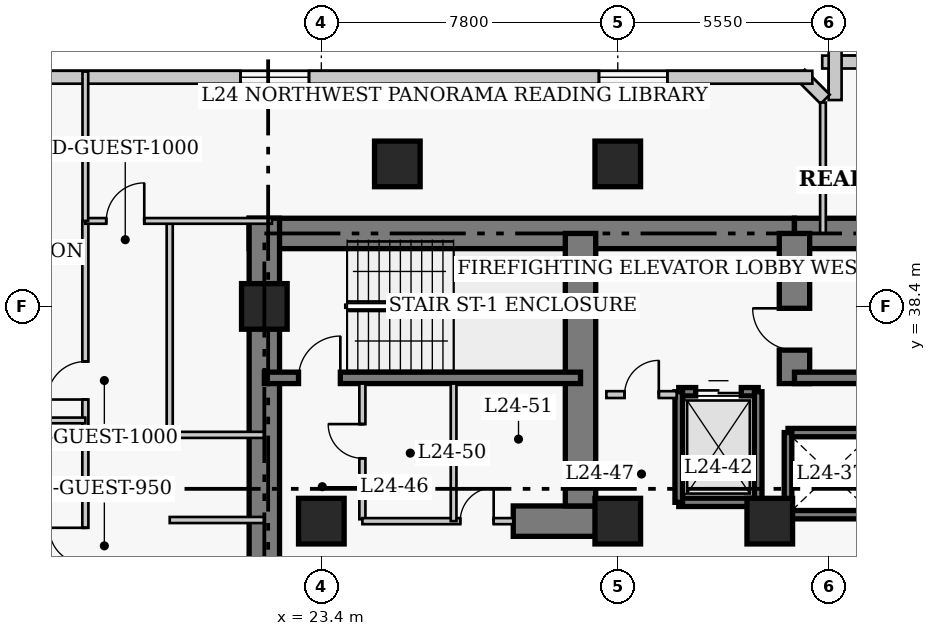
"""IFC4 building model, lengths in metres.
Left out: names, types, materials, properties, quantities, classifications, styles, units other than length and angle.
Written with IfcOpenShell. Run it as: python <this file> out.ifc"""

import sys

from ifc_helpers import new_model, si_unit, direction, frame, frame_2d, origin, origin_2d, place, context, subcontext, project, spatial, rectangle, extrude, element, fill, save


model = new_model("IFC4")
c1 = context("Model", 3, precision=1e-05, world=origin(), true_north=direction((0.0, 1.0)))
c2 = subcontext(c1, "Body", "Model", "MODEL_VIEW")
j1 = project(units=[si_unit("LENGTHUNIT", "METRE"), si_unit("PLANEANGLEUNIT", "RADIAN")], contexts=[c1])
p1 = place(None, origin())
s1 = spatial("IfcSite", under=j1, at=p1, CompositionType="ELEMENT")
p2 = place(p1, origin())
s2 = spatial("IfcBuilding", under=s1, at=p2, CompositionType="ELEMENT")
p3 = place(p2, frame((0.0, 0.0, 99.4)))
s3 = spatial("IfcBuildingStorey", under=s2, at=p3, CompositionType="ELEMENT", Elevation=99.4)
p4 = place(p3, frame((21.5, 40.32, 0.0), z_axis=(0.0, 0.0, 1.0), x_axis=(1.0, 0.0, 0.0)))
e1 = element("IfcWall", 1, at=p4, inside=s3, PredefinedType="SHEAR", context=c2, shape_type="SweptSolid", body=[
    extrude(rectangle(XDim=14.35, YDim=0.8, at=frame_2d((7.175, 0.0))), origin(), (0.0, 0.0, 1.0), 3.8),
])
p5 = place(p3, frame((35.85, 40.32, 0.0), z_axis=(0.0, 0.0, 1.0), x_axis=(1.0, 0.0, 0.0)))
e2 = element("IfcWall", 2, at=p5, inside=s3, PredefinedType="SHEAR", context=c2, shape_type="SweptSolid", body=[
    extrude(rectangle(XDim=12.6, YDim=0.8, at=frame_2d((6.3, 0.0))), origin(), (0.0, 0.0, 1.0), 3.8),
])
p6 = place(p3, frame((21.9, 27.05, 0.0), z_axis=(0.0, 0.0, 1.0), x_axis=(0.0, 1.0, 0.0)))
e3 = element("IfcWall", 3, at=p6, inside=s3, PredefinedType="SHEAR", context=c2, shape_type="SweptSolid", body=[
    extrude(rectangle(XDim=13.67, YDim=0.8, at=frame_2d((6.835, 0.0))), origin(), (0.0, 0.0, 1.0), 3.8),
])
p7 = place(p3, frame((28.45, 32.75, 0.0), z_axis=(0.0, 0.0, 1.0), x_axis=(1.0, 0.0, 0.0)))
e4 = element("IfcWall", 4, at=p7, inside=s3, PredefinedType="SHEAR", context=c2, shape_type="SweptSolid", body=[
    extrude(rectangle(XDim=2.4, YDim=0.8, at=frame_2d((1.2, 0.0))), origin(), (0.0, 0.0, 1.0), 3.8),
])
p8 = place(p3, frame((30.22, 33.15, 0.0), z_axis=(0.0, 0.0, 1.0), x_axis=(0.0, 1.0, 0.0)))
e5 = element("IfcWall", 5, at=p8, inside=s3, PredefinedType="SHEAR", context=c2, shape_type="SweptSolid", body=[
    extrude(rectangle(XDim=7.17, YDim=0.8, at=frame_2d((3.585, 0.0))), origin(), (0.0, 0.0, 1.0), 3.8),
])
p9 = place(p3, frame((35.85, 36.37, 0.0), z_axis=(0.0, 0.0, 1.0), x_axis=(0.0, 1.0, 0.0)))
e6 = element("IfcWall", 6, at=p9, inside=s3, PredefinedType="SHEAR", context=c2, shape_type="SweptSolid", body=[
    extrude(rectangle(XDim=3.95, YDim=0.8, at=frame_2d((1.975, 0.0))), origin(), (0.0, 0.0, 1.0), 3.8),
])
p10 = place(p9, frame((0.88, 0.0, 0.0)))
e7 = element("IfcOpeningElement", 7, at=p10, cuts=e6, PredefinedType="OPENING", context=c2, shape_type="SweptSolid", body=[
    extrude(rectangle(XDim=1.1, YDim=2.15, at=frame_2d((0.55, 1.075))), frame((0.0, 0.41, 0.0), z_axis=(0.0, -1.0, 0.0), x_axis=(1.0, 0.0, 0.0)), (0.0, 0.0, 1.0), 0.82),
])
p11 = place(p3, frame((21.9, 36.52, 0.0), z_axis=(0.0, 0.0, 1.0), x_axis=(1.0, 0.0, 0.0)))
e8 = element("IfcWall", 8, at=p11, inside=s3, PredefinedType="SHEAR", context=c2, shape_type="SweptSolid", body=[
    extrude(rectangle(XDim=8.32, YDim=0.3, at=frame_2d((4.16, 0.0))), origin(), (0.0, 0.0, 1.0), 3.8),
])
p12 = place(p11, frame((0.9, 0.0, 0.0)))
e9 = element("IfcOpeningElement", 9, at=p12, cuts=e8, PredefinedType="OPENING", context=c2, shape_type="SweptSolid", body=[
    extrude(rectangle(XDim=1.1, YDim=2.15, at=frame_2d((0.55, 1.075))), frame((0.0, 0.16, 0.0), z_axis=(0.0, -1.0, 0.0), x_axis=(1.0, 0.0, 0.0)), (0.0, 0.0, 1.0), 0.32),
])
p13 = place(p3, frame((35.85, 36.52, 0.0), z_axis=(0.0, 0.0, 1.0), x_axis=(1.0, 0.0, 0.0)))
e10 = element("IfcWall", 10, at=p13, inside=s3, PredefinedType="SHEAR", context=c2, shape_type="SweptSolid", body=[
    extrude(rectangle(XDim=8.33, YDim=0.3, at=frame_2d((4.165, 0.0))), origin(), (0.0, 0.0, 1.0), 3.8),
])
for number, where, z_axis, x_axis in (
    (11, (21.9, 38.4, 0.0), (0.0, 0.0, 1.0), (1.0, 0.0, 0.0)),
    (12, (23.4, 32.75, 0.0), (0.0, 0.0, 1.0), (1.0, 0.0, 0.0)),
    (13, (31.2, 32.75, 0.0), (0.0, 0.0, 1.0), (1.0, 0.0, 0.0)),
    (14, (35.2, 32.75, 0.0), (0.0, 0.0, 1.0), (1.0, 0.0, 0.0)),
    (15, (25.4, 42.15, 0.0), (0.0, 0.0, 1.0), (1.0, 0.0, 0.0)),
    (16, (31.2, 42.15, 0.0), (0.0, 0.0, 1.0), (1.0, 0.0, 0.0)),
):
    element("IfcColumn", number, at=place(p3, frame(where, z_axis=z_axis, x_axis=x_axis)), inside=s3, PredefinedType="COLUMN", context=c2, shape_type="SweptSolid", body=[
        extrude(rectangle(XDim=1.2, YDim=1.2, at=origin_2d()), origin(), (0.0, 0.0, 1.0), 3.8),
    ])
p14 = place(p3, frame((41.42, 44.83, 0.0), z_axis=(0.0, 0.0, 1.0), x_axis=(-1.0, 0.0, 0.0)))
e17 = element("IfcWall", 17, at=p14, inside=s3, PredefinedType="SOLIDWALL", context=c2, shape_type="SweptSolid", body=[
    extrude(rectangle(XDim=4.84, YDim=0.34, at=frame_2d((2.42, 0.0))), origin(), (0.0, 0.0, 1.0), 3.54),
])
p15 = place(p14, frame((1.52, 0.0, 0.85)))
e18 = element("IfcOpeningElement", 18, at=p15, cuts=e17, PredefinedType="OPENING", context=c2, shape_type="SweptSolid", body=[
    extrude(rectangle(XDim=1.8, YDim=1.8, at=frame_2d((0.9, 0.9))), frame((0.0, 0.18, 0.0), z_axis=(0.0, -1.0, 0.0), x_axis=(1.0, 0.0, 0.0)), (0.0, 0.0, 1.0), 0.36),
])
p16 = place(p3, frame((36.92, 45.17, 0.0), z_axis=(0.0, 0.0, 1.0), x_axis=(0.0, -1.0, 0.0)))
e19 = element("IfcWall", 19, at=p16, inside=s3, PredefinedType="SOLIDWALL", context=c2, shape_type="SweptSolid", body=[
    extrude(rectangle(XDim=1.34, YDim=0.34, at=frame_2d((0.67, 0.0))), origin(), (0.0, 0.0, 1.0), 3.54),
])
p17 = place(p3, frame((36.658, 43.852, 0.0), z_axis=(0.0, 0.0, 1.0), x_axis=(-0.707238225886, 0.706975312048, 0.0)))
e20 = element("IfcWall", 20, at=p17, inside=s3, PredefinedType="SOLIDWALL", context=c2, shape_type="SweptSolid", body=[
    extrude(rectangle(XDim=0.929, YDim=0.34, at=frame_2d((0.464, 0.0))), origin(), (0.0, 0.0, 1.0), 3.54),
])
p18 = place(p3, frame((36.32, 44.43, 0.0), z_axis=(0.0, 0.0, 1.0), x_axis=(-1.0, 0.0, 0.0)))
e21 = element("IfcWall", 21, at=p18, inside=s3, PredefinedType="SOLIDWALL", context=c2, shape_type="SweptSolid", body=[
    extrude(rectangle(XDim=28.29, YDim=0.34, at=frame_2d((14.145, 0.0))), origin(), (0.0, 0.0, 1.0), 3.54),
])
p19 = place(p18, frame((3.815, 0.0, 0.85)))
e22 = element("IfcOpeningElement", 22, at=p19, cuts=e21, PredefinedType="OPENING", context=c2, shape_type="SweptSolid", body=[
    extrude(rectangle(XDim=1.8, YDim=1.8, at=frame_2d((0.9, 0.9))), frame((0.0, 0.18, 0.0), z_axis=(0.0, -1.0, 0.0), x_axis=(1.0, 0.0, 0.0)), (0.0, 0.0, 1.0), 0.36),
])
p20 = place(p18, frame((13.245, 0.0, 0.85)))
e23 = element("IfcOpeningElement", 23, at=p20, cuts=e21, PredefinedType="OPENING", context=c2, shape_type="SweptSolid", body=[
    extrude(rectangle(XDim=1.8, YDim=1.8, at=frame_2d((0.9, 0.9))), frame((0.0, 0.18, 0.0), z_axis=(0.0, -1.0, 0.0), x_axis=(1.0, 0.0, 0.0)), (0.0, 0.0, 1.0), 0.36),
])
p21 = place(p18, frame((22.675, 0.0, 0.85)))
e24 = element("IfcOpeningElement", 24, at=p21, cuts=e21, PredefinedType="OPENING", context=c2, shape_type="SweptSolid", body=[
    extrude(rectangle(XDim=1.8, YDim=1.8, at=frame_2d((0.9, 0.9))), frame((0.0, 0.18, 0.0), z_axis=(0.0, -1.0, 0.0), x_axis=(1.0, 0.0, 0.0)), (0.0, 0.0, 1.0), 0.36),
])
for number, where, z_axis, x_axis in (
    (25, (35.68, 35.08, 0.0), (0.0, 0.0, 1.0), (1.0, 0.0, 0.0)),
    (26, (35.68, 32.92, 0.0), (0.0, 0.0, 1.0), (1.0, 0.0, 0.0)),
):
    element("IfcWall", number, at=place(p3, frame(where, z_axis=z_axis, x_axis=x_axis)), inside=s3, PredefinedType="SHEAR", context=c2, shape_type="SweptSolid", body=[
        extrude(rectangle(XDim=2.32, YDim=0.22, at=frame_2d((1.16, 0.0))), origin(), (0.0, 0.0, 1.0), 3.8),
    ])
p22 = place(p3, frame((35.68, 32.92, 0.0), z_axis=(0.0, 0.0, 1.0), x_axis=(0.0, 1.0, 0.0)))
e27 = element("IfcWall", 27, at=p22, inside=s3, PredefinedType="SHEAR", context=c2, shape_type="SweptSolid", body=[
    extrude(rectangle(XDim=2.16, YDim=0.2, at=frame_2d((1.08, 0.0))), origin(), (0.0, 0.0, 1.0), 3.8),
])
p23 = place(p3, frame((32.805, 36.155, 0.0), z_axis=(0.0, 0.0, 1.0), x_axis=(1.0, 0.0, 0.0)))
e28 = element("IfcWall", 28, at=p23, inside=s3, PredefinedType="SHEAR", context=c2, shape_type="SweptSolid", body=[
    extrude(rectangle(XDim=2.09, YDim=0.22, at=frame_2d((1.045, 0.0))), origin(), (0.0, 0.0, 1.0), 3.8),
])
p24 = place(p23, frame((0.445, 0.0, 0.0)))
e29 = element("IfcOpeningElement", 29, at=p24, cuts=e28, PredefinedType="OPENING", context=c2, shape_type="SweptSolid", body=[
    extrude(rectangle(XDim=1.2, YDim=2.15, at=frame_2d((0.6, 1.075))), frame((0.0, 0.12, 0.0), z_axis=(0.0, -1.0, 0.0), x_axis=(1.0, 0.0, 0.0)), (0.0, 0.0, 1.0), 0.24),
])
p25 = place(p3, frame((32.805, 33.245, 0.0), z_axis=(0.0, 0.0, 1.0), x_axis=(1.0, 0.0, 0.0)))
e30 = element("IfcWall", 30, at=p25, inside=s3, PredefinedType="SHEAR", context=c2, shape_type="SweptSolid", body=[
    extrude(rectangle(XDim=2.09, YDim=0.22, at=frame_2d((1.045, 0.0))), origin(), (0.0, 0.0, 1.0), 3.8),
])
for number, where, z_axis, x_axis in (
    (31, (32.805, 33.245, 0.0), (0.0, 0.0, 1.0), (0.0, 1.0, 0.0)),
    (32, (34.895, 33.245, 0.0), (0.0, 0.0, 1.0), (0.0, 1.0, 0.0)),
):
    element("IfcWall", number, at=place(p3, frame(where, z_axis=z_axis, x_axis=x_axis)), inside=s3, PredefinedType="SHEAR", context=c2, shape_type="SweptSolid", body=[
        extrude(rectangle(XDim=2.91, YDim=0.2, at=frame_2d((1.455, 0.0))), origin(), (0.0, 0.0, 1.0), 3.8),
    ])
p26 = place(p3, frame((30.9, 36.08, 0.0), z_axis=(0.0, 0.0, 1.0), x_axis=(1.0, 0.0, 0.0)))
e33 = element("IfcWall", 33, at=p26, inside=s3, PredefinedType="PARTITIONING", context=c2, shape_type="SweptSolid", body=[
    extrude(rectangle(XDim=1.85, YDim=0.18, at=frame_2d((0.925, 0.0))), origin(), (0.0, 0.0, 1.0), 3.54),
])
p27 = place(p26, frame((0.48, 0.0, 0.0)))
e34 = element("IfcOpeningElement", 34, at=p27, cuts=e33, PredefinedType="OPENING", context=c2, shape_type="SweptSolid", body=[
    extrude(rectangle(XDim=0.9, YDim=2.15, at=frame_2d((0.45, 1.075))), frame((0.0, 0.1, 0.0), z_axis=(0.0, -1.0, 0.0), x_axis=(1.0, 0.0, 0.0)), (0.0, 0.0, 1.0), 0.2),
])
p28 = place(p3, frame((24.48, 32.8, 0.0), z_axis=(0.0, 0.0, 1.0), x_axis=(0.0, 1.0, 0.0)))
e35 = element("IfcWall", 35, at=p28, inside=s3, PredefinedType="PARTITIONING", context=c2, shape_type="SweptSolid", body=[
    extrude(rectangle(XDim=3.57, YDim=0.16, at=frame_2d((1.785, 0.0))), origin(), (0.0, 0.0, 1.0), 3.54),
])
p29 = place(p28, frame((1.604, 0.0, 0.0)))
e36 = element("IfcOpeningElement", 36, at=p29, cuts=e35, PredefinedType="OPENING", context=c2, shape_type="SweptSolid", body=[
    extrude(rectangle(XDim=0.9, YDim=2.1, at=frame_2d((0.45, 1.05))), frame((0.0, 0.09, 0.0), z_axis=(0.0, -1.0, 0.0), x_axis=(1.0, 0.0, 0.0)), (0.0, 0.0, 1.0), 0.18),
])
p30 = place(p3, frame((24.48, 32.75, 0.0), z_axis=(0.0, 0.0, 1.0), x_axis=(1.0, 0.0, 0.0)))
e37 = element("IfcWall", 37, at=p30, inside=s3, PredefinedType="PARTITIONING", context=c2, shape_type="SweptSolid", body=[
    extrude(rectangle(XDim=3.97, YDim=0.16, at=frame_2d((1.985, 0.0))), origin(), (0.0, 0.0, 1.0), 3.54),
])
p31 = place(p30, frame((2.575, 0.0, 0.0)))
e38 = element("IfcOpeningElement", 38, at=p31, cuts=e37, PredefinedType="OPENING", context=c2, shape_type="SweptSolid", body=[
    extrude(rectangle(XDim=0.88, YDim=2.05, at=frame_2d((0.44, 1.025))), frame((0.0, 0.09, 0.0), z_axis=(0.0, -1.0, 0.0), x_axis=(1.0, 0.0, 0.0)), (0.0, 0.0, 1.0), 0.18),
])
p32 = place(p3, frame((26.88, 32.75, 0.0), z_axis=(0.0, 0.0, 1.0), x_axis=(0.0, 1.0, 0.0)))
e39 = element("IfcWall", 39, at=p32, inside=s3, PredefinedType="PARTITIONING", context=c2, shape_type="SweptSolid", body=[
    extrude(rectangle(XDim=3.62, YDim=0.15, at=frame_2d((1.81, 0.0))), origin(), (0.0, 0.0, 1.0), 3.54),
])
p33 = place(p3, frame((17.19, 6.65, 0.0), z_axis=(0.0, 0.0, 1.0), x_axis=(0.0, 1.0, 0.0)))
e40 = element("IfcWall", 40, at=p33, inside=s3, PredefinedType="PARTITIONING", context=c2, shape_type="SweptSolid", body=[
    extrude(rectangle(XDim=34.0, YDim=0.16, at=frame_2d((17.0, 0.0))), origin(), (0.0, 0.0, 1.0), 3.54),
])
p34 = place(p33, frame((1.8, 0.0, 0.0)))
e41 = element("IfcOpeningElement", 41, at=p34, cuts=e40, PredefinedType="OPENING", context=c2, shape_type="SweptSolid", body=[
    extrude(rectangle(XDim=0.95, YDim=2.1, at=frame_2d((0.475, 1.05))), frame((0.0, 0.09, 0.0), z_axis=(0.0, -1.0, 0.0), x_axis=(1.0, 0.0, 0.0)), (0.0, 0.0, 1.0), 0.18),
])
p35 = place(p33, frame((8.475, 0.0, 0.0)))
e42 = element("IfcOpeningElement", 42, at=p35, cuts=e40, PredefinedType="OPENING", context=c2, shape_type="SweptSolid", body=[
    extrude(rectangle(XDim=0.95, YDim=2.1, at=frame_2d((0.475, 1.05))), frame((0.0, 0.09, 0.0), z_axis=(0.0, -1.0, 0.0), x_axis=(1.0, 0.0, 0.0)), (0.0, 0.0, 1.0), 0.18),
])
p36 = place(p33, frame((17.275, 0.0, 0.0)))
e43 = element("IfcOpeningElement", 43, at=p36, cuts=e40, PredefinedType="OPENING", context=c2, shape_type="SweptSolid", body=[
    extrude(rectangle(XDim=0.95, YDim=2.1, at=frame_2d((0.475, 1.05))), frame((0.0, 0.09, 0.0), z_axis=(0.0, -1.0, 0.0), x_axis=(1.0, 0.0, 0.0)), (0.0, 0.0, 1.0), 0.18),
])
p37 = place(p33, frame((24.975, 0.0, 0.0)))
e44 = element("IfcOpeningElement", 44, at=p37, cuts=e40, PredefinedType="OPENING", context=c2, shape_type="SweptSolid", body=[
    extrude(rectangle(XDim=0.95, YDim=2.1, at=frame_2d((0.475, 1.05))), frame((0.0, 0.09, 0.0), z_axis=(0.0, -1.0, 0.0), x_axis=(1.0, 0.0, 0.0)), (0.0, 0.0, 1.0), 0.18),
])
p38 = place(p33, frame((29.3, 0.0, 0.0)))
e45 = element("IfcOpeningElement", 45, at=p38, cuts=e40, PredefinedType="OPENING", context=c2, shape_type="SweptSolid", body=[
    extrude(rectangle(XDim=1.0, YDim=2.15, at=frame_2d((0.5, 1.075))), frame((0.0, 0.09, 0.0), z_axis=(0.0, -1.0, 0.0), x_axis=(1.0, 0.0, 0.0)), (0.0, 0.0, 1.0), 0.18),
])
p39 = place(p3, frame((19.41, 35.02, 0.0), z_axis=(0.0, 0.0, 1.0), x_axis=(0.0, 1.0, 0.0)))
e46 = element("IfcWall", 46, at=p39, inside=s3, PredefinedType="PARTITIONING", context=c2, shape_type="SweptSolid", body=[
    extrude(rectangle(XDim=5.63, YDim=0.16, at=frame_2d((2.815, 0.0))), origin(), (0.0, 0.0, 1.0), 3.54),
])
for number, where, z_axis, x_axis in (
    (47, (19.41, 35.02, 0.0), (0.0, 0.0, 1.0), (1.0, 0.0, 0.0)),
    (48, (19.41, 32.78, 0.0), (0.0, 0.0, 1.0), (1.0, 0.0, 0.0)),
):
    element("IfcWall", number, at=place(p3, frame(where, z_axis=z_axis, x_axis=x_axis)), inside=s3, PredefinedType="PARTITIONING", context=c2, shape_type="SweptSolid", body=[
        extrude(rectangle(XDim=2.49, YDim=0.16, at=frame_2d((1.245, 0.0))), origin(), (0.0, 0.0, 1.0), 3.54),
    ])
p40 = place(p3, frame((17.19, 40.65, 0.0), z_axis=(0.0, 0.0, 1.0), x_axis=(1.0, 0.0, 0.0)))
e49 = element("IfcWall", 49, at=p40, inside=s3, PredefinedType="PARTITIONING", context=c2, shape_type="SweptSolid", body=[
    extrude(rectangle(XDim=4.91, YDim=0.15, at=frame_2d((2.455, 0.0))), origin(), (0.0, 0.0, 1.0), 3.54),
])
p41 = place(p40, frame((0.55, 0.0, 0.0)))
e50 = element("IfcOpeningElement", 50, at=p41, cuts=e49, PredefinedType="OPENING", context=c2, shape_type="SweptSolid", body=[
    extrude(rectangle(XDim=1.0, YDim=2.15, at=frame_2d((0.5, 1.075))), frame((0.0, 0.085, 0.0), z_axis=(0.0, -1.0, 0.0), x_axis=(1.0, 0.0, 0.0)), (0.0, 0.0, 1.0), 0.17),
])
p42 = place(p3, frame((17.19, 40.65, 0.0), z_axis=(0.0, 0.0, 1.0), x_axis=(0.0, 1.0, 0.0)))
e51 = element("IfcWall", 51, at=p42, inside=s3, PredefinedType="PARTITIONING", context=c2, shape_type="SweptSolid", body=[
    extrude(rectangle(XDim=3.93, YDim=0.15, at=frame_2d((1.965, 0.0))), origin(), (0.0, 0.0, 1.0), 3.54),
])
p43 = place(p3, frame((36.6, 40.32, 0.0), z_axis=(0.0, 0.0, 1.0), x_axis=(0.0, 1.0, 0.0)))
e52 = element("IfcWall", 52, at=p43, inside=s3, PredefinedType="PARTITIONING", context=c2, shape_type="SweptSolid", body=[
    extrude(rectangle(XDim=3.445, YDim=0.15, at=frame_2d((1.723, 0.0))), origin(), (0.0, 0.0, 1.0), 3.54),
])
p44 = place(p3, frame((14.45, 35.4, 0.0), z_axis=(0.0, 0.0, 1.0), x_axis=(1.0, 0.0, 0.0)))
e53 = element("IfcWall", 53, at=p44, inside=s3, PredefinedType="PARTITIONING", context=c2, shape_type="SweptSolid", body=[
    extrude(rectangle(XDim=2.74, YDim=0.15, at=frame_2d((1.37, 0.0))), origin(), (0.0, 0.0, 1.0), 3.54),
])
p45 = place(p19, origin())
e54 = element("IfcWindow", 54, at=p45, inside=s3, PartitioningType="SINGLE_PANEL", PredefinedType="WINDOW", context=c2, shape_type="SweptSolid", body=[
    extrude(rectangle(XDim=1.8, YDim=1.8, at=frame_2d((0.9, 0.9))), frame((0.0, 0.03, 0.0), z_axis=(0.0, -1.0, 0.0), x_axis=(1.0, 0.0, 0.0)), (0.0, 0.0, 1.0), 0.06),
])
fill(e22, e54)
p46 = place(p20, origin())
e55 = element("IfcWindow", 55, at=p46, inside=s3, PartitioningType="SINGLE_PANEL", PredefinedType="WINDOW", context=c2, shape_type="SweptSolid", body=[
    extrude(rectangle(XDim=1.8, YDim=1.8, at=frame_2d((0.9, 0.9))), frame((0.0, 0.03, 0.0), z_axis=(0.0, -1.0, 0.0), x_axis=(1.0, 0.0, 0.0)), (0.0, 0.0, 1.0), 0.06),
])
fill(e23, e55)
p47 = place(p24, origin())
e56 = element("IfcDoor", 56, at=p47, inside=s3, OperationType="DOUBLE_DOOR_SLIDING", PredefinedType="DOOR", context=c2, shape_type="SweptSolid", body=[
    extrude(rectangle(XDim=1.2, YDim=2.15, at=frame_2d((0.6, 1.075))), frame((0.0, 0.025, 0.0), z_axis=(0.0, -1.0, 0.0), x_axis=(1.0, 0.0, 0.0)), (0.0, 0.0, 1.0), 0.05),
])
fill(e29, e56)
p48 = place(p27, origin())
e57 = element("IfcDoor", 57, at=p48, inside=s3, OperationType="SINGLE_SWING_RIGHT", PredefinedType="DOOR", context=c2, shape_type="SweptSolid", body=[
    extrude(rectangle(XDim=0.9, YDim=2.15, at=frame_2d((0.45, 1.075))), frame((0.0, 0.025, 0.0), z_axis=(0.0, -1.0, 0.0), x_axis=(1.0, 0.0, 0.0)), (0.0, 0.0, 1.0), 0.05),
])
fill(e34, e57)
p49 = place(p29, origin())
e58 = element("IfcDoor", 58, at=p49, inside=s3, OperationType="SINGLE_SWING_RIGHT", PredefinedType="DOOR", context=c2, shape_type="SweptSolid", body=[
    extrude(rectangle(XDim=0.9, YDim=2.1, at=frame_2d((0.45, 1.05))), frame((0.0, 0.025, 0.0), z_axis=(0.0, -1.0, 0.0), x_axis=(1.0, 0.0, 0.0)), (0.0, 0.0, 1.0), 0.05),
])
fill(e36, e58)
p50 = place(p31, origin())
e59 = element("IfcDoor", 59, at=p50, inside=s3, OperationType="SINGLE_SWING_RIGHT", PredefinedType="DOOR", context=c2, shape_type="SweptSolid", body=[
    extrude(rectangle(XDim=0.88, YDim=2.05, at=frame_2d((0.44, 1.025))), frame((0.0, 0.025, 0.0), z_axis=(0.0, -1.0, 0.0), x_axis=(1.0, 0.0, 0.0)), (0.0, 0.0, 1.0), 0.05),
])
fill(e38, e59)
p51 = place(p41, origin())
e60 = element("IfcDoor", 60, at=p51, inside=s3, OperationType="SINGLE_SWING_RIGHT", PredefinedType="DOOR", context=c2, shape_type="SweptSolid", body=[
    extrude(rectangle(XDim=1.0, YDim=2.15, at=frame_2d((0.5, 1.075))), frame((0.0, 0.025, 0.0), z_axis=(0.0, -1.0, 0.0), x_axis=(1.0, 0.0, 0.0)), (0.0, 0.0, 1.0), 0.05),
])
fill(e50, e60)
p52 = place(p37, origin())
e61 = element("IfcDoor", 61, at=p52, inside=s3, OperationType="SINGLE_SWING_RIGHT", PredefinedType="DOOR", context=c2, shape_type="SweptSolid", body=[
    extrude(rectangle(XDim=0.95, YDim=2.1, at=frame_2d((0.475, 1.05))), frame((0.0, 0.025, 0.0), z_axis=(0.0, -1.0, 0.0), x_axis=(1.0, 0.0, 0.0)), (0.0, 0.0, 1.0), 0.05),
])
fill(e44, e61)
p53 = place(p38, origin())
e62 = element("IfcDoor", 62, at=p53, inside=s3, OperationType="SINGLE_SWING_LEFT", PredefinedType="DOOR", context=c2, shape_type="SweptSolid", body=[
    extrude(rectangle(XDim=1.0, YDim=2.15, at=frame_2d((0.5, 1.075))), frame((0.0, 0.025, 0.0), z_axis=(0.0, -1.0, 0.0), x_axis=(1.0, 0.0, 0.0)), (0.0, 0.0, 1.0), 0.05),
])
fill(e45, e62)
p54 = place(p12, origin())
e63 = element("IfcDoor", 63, at=p54, inside=s3, OperationType="SINGLE_SWING_RIGHT", PredefinedType="DOOR", context=c2, shape_type="SweptSolid", body=[
    extrude(rectangle(XDim=1.1, YDim=2.15, at=frame_2d((0.55, 1.075))), frame((0.0, 0.025, 0.0), z_axis=(0.0, -1.0, 0.0), x_axis=(1.0, 0.0, 0.0)), (0.0, 0.0, 1.0), 0.05),
])
fill(e9, e63)
p55 = place(p10, origin())
e64 = element("IfcDoor", 64, at=p55, inside=s3, OperationType="SINGLE_SWING_RIGHT", PredefinedType="DOOR", context=c2, shape_type="SweptSolid", body=[
    extrude(rectangle(XDim=1.1, YDim=2.15, at=frame_2d((0.55, 1.075))), frame((0.0, 0.025, 0.0), z_axis=(0.0, -1.0, 0.0), x_axis=(1.0, 0.0, 0.0)), (0.0, 0.0, 1.0), 0.05),
])
fill(e7, e64)
save(model, sys.argv[1])
